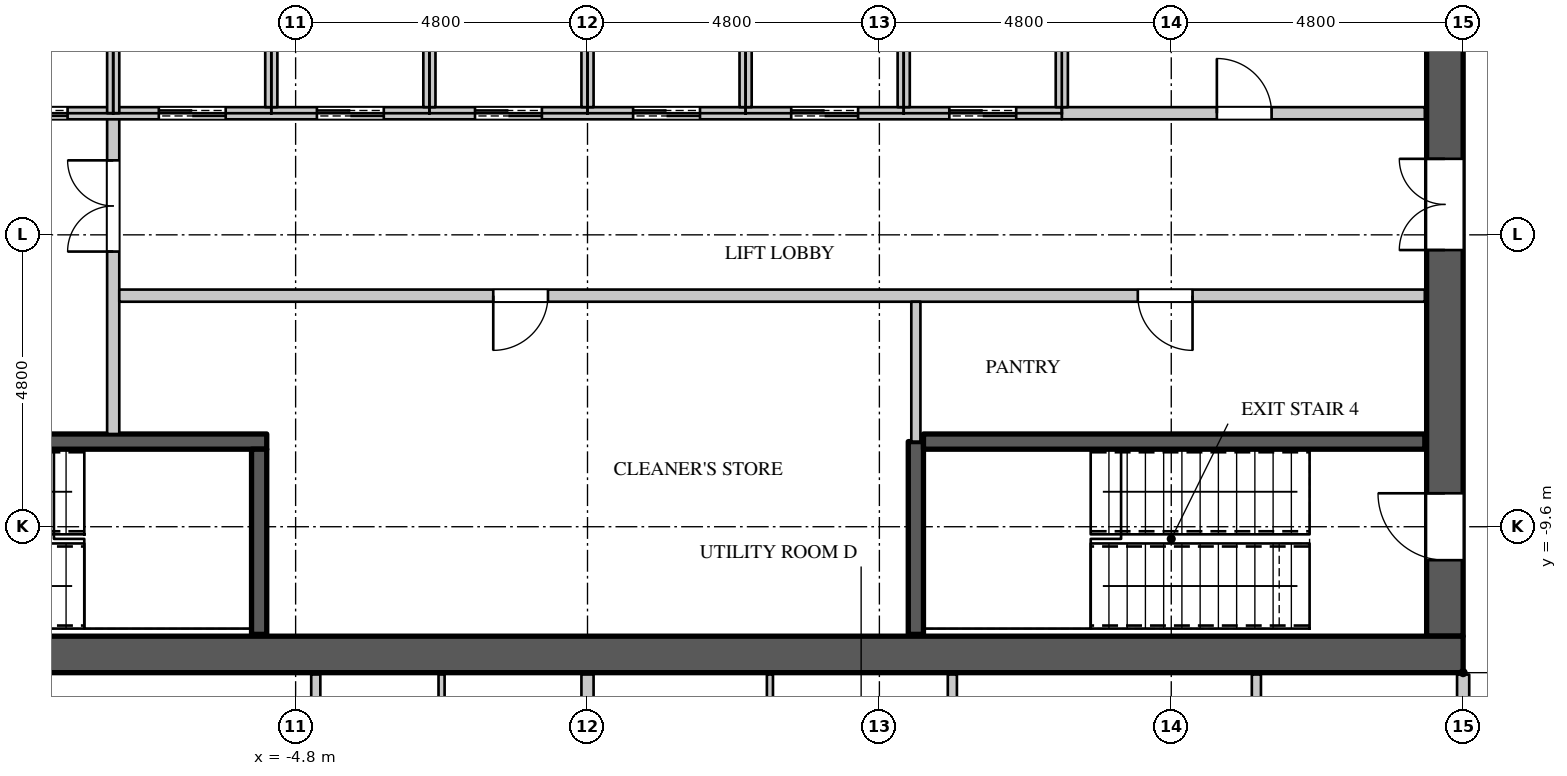
"""IFC4 building model, lengths in metres.
Left out: names, types, materials, properties, quantities, classifications, styles, units other than length and angle.
Written with IfcOpenShell. Run it as: python <this file> out.ifc"""

import sys

from ifc_helpers import new_model, si_unit, direction, frame, frame_2d, origin, place, context, subcontext, project, spatial, rectangle, extrude, element, fill, save


model = new_model("IFC4")
c1 = context("Model", 3, precision=1e-05, world=origin(), true_north=direction((0.0, 1.0)))
c2 = subcontext(c1, "Body", "Model", "MODEL_VIEW")
j1 = project(units=[si_unit("LENGTHUNIT", "METRE"), si_unit("PLANEANGLEUNIT", "RADIAN")], contexts=[c1])
p1 = place(None, origin())
s1 = spatial("IfcSite", under=j1, at=p1, CompositionType="ELEMENT")
p2 = place(p1, origin())
s2 = spatial("IfcBuilding", under=s1, at=p2, CompositionType="ELEMENT")
p3 = place(p2, frame((0.0, 0.0, 226.5)))
s3 = spatial("IfcBuildingStorey", under=s2, at=p3, CompositionType="ELEMENT", Elevation=226.5)
p4 = place(p3, frame((-14.4, -11.7, 0.0), z_axis=(0.0, 0.0, 1.0), x_axis=(1.0, 0.0, 0.0)))
e1 = element("IfcWall", 1, at=p4, inside=s3, PredefinedType="SHEAR", context=c2, shape_type="SweptSolid", body=[
    extrude(rectangle(XDim=28.8, YDim=0.6, at=frame_2d((14.4, 0.0))), origin(), (0.0, 0.0, 1.0), 4.2),
])
p5 = place(p3, frame((14.1, -11.4, 0.0), z_axis=(0.0, 0.0, 1.0), x_axis=(0.0, 1.0, 0.0)))
e2 = element("IfcWall", 2, at=p5, inside=s3, PredefinedType="SHEAR", context=c2, shape_type="SweptSolid", body=[
    extrude(rectangle(XDim=22.8, YDim=0.6, at=frame_2d((11.4, 0.0))), origin(), (0.0, 0.0, 1.0), 4.2),
])
p6 = place(p5, frame((20.45, 0.0, 0.0)))
e3 = element("IfcOpeningElement", 3, at=p6, cuts=e2, PredefinedType="OPENING", context=c2, shape_type="SweptSolid", body=[
    extrude(rectangle(XDim=1.1, YDim=2.2, at=frame_2d((0.55, 1.1))), frame((0.0, 0.31, 0.0), z_axis=(0.0, -1.0, 0.0), x_axis=(1.0, 0.0, 0.0)), (0.0, 0.0, 1.0), 0.62),
])
p7 = place(p5, frame((1.25, 0.0, 0.0)))
e4 = element("IfcOpeningElement", 4, at=p7, cuts=e2, PredefinedType="OPENING", context=c2, shape_type="SweptSolid", body=[
    extrude(rectangle(XDim=1.1, YDim=2.2, at=frame_2d((0.55, 1.1))), frame((0.0, 0.31, 0.0), z_axis=(0.0, -1.0, 0.0), x_axis=(1.0, 0.0, 0.0)), (0.0, 0.0, 1.0), 0.62),
])
p8 = place(p5, frame((14.95, 0.0, 0.0)))
e5 = element("IfcOpeningElement", 5, at=p8, cuts=e2, PredefinedType="OPENING", context=c2, shape_type="SweptSolid", body=[
    extrude(rectangle(XDim=1.5, YDim=2.4, at=frame_2d((0.75, 1.2))), frame((0.0, 0.31, 0.0), z_axis=(0.0, -1.0, 0.0), x_axis=(1.0, 0.0, 0.0)), (0.0, 0.0, 1.0), 0.62),
])
p9 = place(p5, frame((6.35, 0.0, 0.0)))
e6 = element("IfcOpeningElement", 6, at=p9, cuts=e2, PredefinedType="OPENING", context=c2, shape_type="SweptSolid", body=[
    extrude(rectangle(XDim=1.5, YDim=2.4, at=frame_2d((0.75, 1.2))), frame((0.0, 0.31, 0.0), z_axis=(0.0, -1.0, 0.0), x_axis=(1.0, 0.0, 0.0)), (0.0, 0.0, 1.0), 0.62),
])
p10 = place(p3, frame((-7.8, -8.075, 0.0), z_axis=(0.0, 0.0, 1.0), x_axis=(0.0, 1.0, 0.0)))
e7 = element("IfcWall", 7, at=p10, inside=s3, PredefinedType="PARTITIONING", context=c2, shape_type="SweptSolid", body=[
    extrude(rectangle(XDim=5.275, YDim=0.2, at=frame_2d((2.637, 0.0))), origin(), (0.0, 0.0, 1.0), 3.95),
])
p11 = place(p10, frame((3.0, 0.0, 0.0)))
e8 = element("IfcOpeningElement", 8, at=p11, cuts=e7, PredefinedType="OPENING", context=c2, shape_type="SweptSolid", body=[
    extrude(rectangle(XDim=1.5, YDim=2.4, at=frame_2d((0.75, 1.2))), frame((0.0, 0.11, 0.0), z_axis=(0.0, -1.0, 0.0), x_axis=(1.0, 0.0, 0.0)), (0.0, 0.0, 1.0), 0.22),
])
p12 = place(p3, frame((-7.7, -5.8, 0.0), z_axis=(0.0, 0.0, 1.0), x_axis=(1.0, 0.0, 0.0)))
e9 = element("IfcWall", 9, at=p12, inside=s3, PredefinedType="PARTITIONING", context=c2, shape_type="SweptSolid", body=[
    extrude(rectangle(XDim=21.47, YDim=0.2, at=frame_2d((10.735, 0.0))), origin(), (0.0, 0.0, 1.0), 3.95),
])
p13 = place(p12, frame((6.15, 0.0, 0.0)))
e10 = element("IfcOpeningElement", 10, at=p13, cuts=e9, PredefinedType="OPENING", context=c2, shape_type="SweptSolid", body=[
    extrude(rectangle(XDim=0.9, YDim=2.2, at=frame_2d((0.45, 1.1))), frame((0.0, 0.11, 0.0), z_axis=(0.0, -1.0, 0.0), x_axis=(1.0, 0.0, 0.0)), (0.0, 0.0, 1.0), 0.22),
])
p14 = place(p12, frame((16.75, 0.0, 0.0)))
e11 = element("IfcOpeningElement", 11, at=p14, cuts=e9, PredefinedType="OPENING", context=c2, shape_type="SweptSolid", body=[
    extrude(rectangle(XDim=0.9, YDim=2.2, at=frame_2d((0.45, 1.1))), frame((0.0, 0.11, 0.0), z_axis=(0.0, -1.0, 0.0), x_axis=(1.0, 0.0, 0.0)), (0.0, 0.0, 1.0), 0.22),
])
p15 = place(p3, frame((14.4, -14.3, 0.0), z_axis=(0.0, 0.0, 1.0), x_axis=(0.0, 1.0, 0.0)))
e12 = element("IfcWall", 12, at=p15, inside=s3, PredefinedType="PARTITIONING", context=c2, shape_type="SweptSolid", body=[
    extrude(rectangle(XDim=2.27, YDim=0.2, at=frame_2d((1.135, 0.0))), origin(), (0.0, 0.0, 1.0), 3.95),
])
p16 = place(p15, frame((0.55, 0.0, 0.0)))
e13 = element("IfcOpeningElement", 13, at=p16, cuts=e12, PredefinedType="OPENING", context=c2, shape_type="SweptSolid", body=[
    extrude(rectangle(XDim=1.1, YDim=2.4, at=frame_2d((0.55, 1.2))), frame((0.0, 0.11, 0.0), z_axis=(0.0, -1.0, 0.0), x_axis=(1.0, 0.0, 0.0)), (0.0, 0.0, 1.0), 0.22),
])
p17 = place(p3, frame((-4.469, -25.95, 0.0), z_axis=(0.0, 0.0, 1.0), x_axis=(0.0, 1.0, 0.0)))
e14 = element("IfcWall", 14, at=p17, inside=s3, PredefinedType="PARTITIONING", context=c2, shape_type="SweptSolid", body=[
    extrude(rectangle(XDim=13.92, YDim=0.15, at=frame_2d((6.96, 0.0))), origin(), (0.0, 0.0, 1.0), 3.3),
])
p18 = place(p17, frame((3.3, 0.0, 0.0)))
e15 = element("IfcOpeningElement", 15, at=p18, cuts=e14, PredefinedType="OPENING", context=c2, shape_type="SweptSolid", body=[
    extrude(rectangle(XDim=0.95, YDim=2.2, at=frame_2d((0.475, 1.1))), frame((0.0, 0.085, 0.0), z_axis=(0.0, -1.0, 0.0), x_axis=(1.0, 0.0, 0.0)), (0.0, 0.0, 1.0), 0.17),
])
p19 = place(p3, frame((5.4, -8.2, 0.0), z_axis=(0.0, 0.0, 1.0), x_axis=(0.0, 1.0, 0.0)))
e16 = element("IfcWall", 16, at=p19, inside=s3, PredefinedType="PARTITIONING", context=c2, shape_type="SweptSolid", body=[
    extrude(rectangle(XDim=2.3, YDim=0.15, at=frame_2d((1.15, 0.0))), origin(), (0.0, 0.0, 1.0), 3.95),
])
p20 = place(p3, frame((6.0, -18.625, 0.0), z_axis=(0.0, 0.0, 1.0), x_axis=(0.0, 1.0, 0.0)))
e17 = element("IfcWall", 17, at=p20, inside=s3, PredefinedType="PARTITIONING", context=c2, shape_type="SweptSolid", body=[
    extrude(rectangle(XDim=6.595, YDim=0.15, at=frame_2d((3.297, 0.0))), origin(), (0.0, 0.0, 1.0), 3.95),
])
p21 = place(p20, frame((2.85, 0.0, 0.0)))
e18 = element("IfcOpeningElement", 18, at=p21, cuts=e17, PredefinedType="OPENING", context=c2, shape_type="SweptSolid", body=[
    extrude(rectangle(XDim=0.9, YDim=2.2, at=frame_2d((0.45, 1.1))), frame((0.0, 0.085, 0.0), z_axis=(0.0, -1.0, 0.0), x_axis=(1.0, 0.0, 0.0)), (0.0, 0.0, 1.0), 0.17),
])
p22 = place(p3, frame((11.0, -17.675, 0.0), z_axis=(0.0, 0.0, 1.0), x_axis=(0.0, 1.0, 0.0)))
e19 = element("IfcWall", 19, at=p22, inside=s3, PredefinedType="PARTITIONING", context=c2, shape_type="SweptSolid", body=[
    extrude(rectangle(XDim=5.645, YDim=0.15, at=frame_2d((2.823, 0.0))), origin(), (0.0, 0.0, 1.0), 3.95),
])
p23 = place(p22, frame((2.35, 0.0, 0.0)))
e20 = element("IfcOpeningElement", 20, at=p23, cuts=e19, PredefinedType="OPENING", context=c2, shape_type="SweptSolid", body=[
    extrude(rectangle(XDim=0.95, YDim=2.2, at=frame_2d((0.475, 1.1))), frame((0.0, 0.085, 0.0), z_axis=(0.0, -1.0, 0.0), x_axis=(1.0, 0.0, 0.0)), (0.0, 0.0, 1.0), 0.17),
])
p24 = place(p3, frame((0.0, -26.455, 0.0), z_axis=(0.0, 0.0, 1.0), x_axis=(0.0, 1.0, 0.0)))
e21 = element("IfcWall", 21, at=p24, inside=s3, PredefinedType="PARTITIONING", context=c2, shape_type="SweptSolid", body=[
    extrude(rectangle(XDim=14.425, YDim=0.2, at=frame_2d((7.212, 0.0))), origin(), (0.0, 0.0, 1.0), 3.95),
])
p25 = place(p3, frame((7.8, -2.8, 0.0), z_axis=(0.0, 0.0, 1.0), x_axis=(1.0, 0.0, 0.0)))
e22 = element("IfcWall", 22, at=p25, inside=s3, PredefinedType="PARTITIONING", context=c2, shape_type="SweptSolid", body=[
    extrude(rectangle(XDim=5.97, YDim=0.2, at=frame_2d((2.985, 0.0))), origin(), (0.0, 0.0, 1.0), 3.95),
])
p26 = place(p25, frame((2.55, 0.0, 0.0)))
e23 = element("IfcOpeningElement", 23, at=p26, cuts=e22, PredefinedType="OPENING", context=c2, shape_type="SweptSolid", body=[
    extrude(rectangle(XDim=0.9, YDim=2.2, at=frame_2d((0.45, 1.1))), frame((0.0, 0.11, 0.0), z_axis=(0.0, -1.0, 0.0), x_axis=(1.0, 0.0, 0.0)), (0.0, 0.0, 1.0), 0.22),
])
p27 = place(p3, frame((-10.4, -2.8, 0.0), z_axis=(0.0, 0.0, 1.0), x_axis=(1.0, 0.0, 0.0)))
e24 = element("IfcWall", 24, at=p27, inside=s3, PredefinedType="PARTITIONING", context=c2, shape_type="SweptSolid", body=[
    extrude(rectangle(XDim=18.2, YDim=0.2, at=frame_2d((9.1, 0.0))), origin(), (0.0, 0.0, 1.0), 3.95),
])
p28 = place(p27, frame((0.75, 0.0, 0.0)))
e25 = element("IfcOpeningElement", 25, at=p28, cuts=e24, PredefinedType="OPENING", context=c2, shape_type="SweptSolid", body=[
    extrude(rectangle(XDim=1.1, YDim=2.2, at=frame_2d((0.55, 1.1))), frame((0.0, 0.11, 0.0), z_axis=(0.0, -1.0, 0.0), x_axis=(1.0, 0.0, 0.0)), (0.0, 0.0, 1.0), 0.22),
])
p29 = place(p27, frame((3.35, 0.0, 0.0)))
e26 = element("IfcOpeningElement", 26, at=p29, cuts=e24, PredefinedType="OPENING", context=c2, shape_type="SweptSolid", body=[
    extrude(rectangle(XDim=1.1, YDim=2.2, at=frame_2d((0.55, 1.1))), frame((0.0, 0.11, 0.0), z_axis=(0.0, -1.0, 0.0), x_axis=(1.0, 0.0, 0.0)), (0.0, 0.0, 1.0), 0.22),
])
p30 = place(p27, frame((5.95, 0.0, 0.0)))
e27 = element("IfcOpeningElement", 27, at=p30, cuts=e24, PredefinedType="OPENING", context=c2, shape_type="SweptSolid", body=[
    extrude(rectangle(XDim=1.1, YDim=2.2, at=frame_2d((0.55, 1.1))), frame((0.0, 0.11, 0.0), z_axis=(0.0, -1.0, 0.0), x_axis=(1.0, 0.0, 0.0)), (0.0, 0.0, 1.0), 0.22),
])
p31 = place(p27, frame((8.55, 0.0, 0.0)))
e28 = element("IfcOpeningElement", 28, at=p31, cuts=e24, PredefinedType="OPENING", context=c2, shape_type="SweptSolid", body=[
    extrude(rectangle(XDim=1.1, YDim=2.2, at=frame_2d((0.55, 1.1))), frame((0.0, 0.11, 0.0), z_axis=(0.0, -1.0, 0.0), x_axis=(1.0, 0.0, 0.0)), (0.0, 0.0, 1.0), 0.22),
])
p32 = place(p27, frame((11.15, 0.0, 0.0)))
e29 = element("IfcOpeningElement", 29, at=p32, cuts=e24, PredefinedType="OPENING", context=c2, shape_type="SweptSolid", body=[
    extrude(rectangle(XDim=1.1, YDim=2.2, at=frame_2d((0.55, 1.1))), frame((0.0, 0.11, 0.0), z_axis=(0.0, -1.0, 0.0), x_axis=(1.0, 0.0, 0.0)), (0.0, 0.0, 1.0), 0.22),
])
p33 = place(p27, frame((13.75, 0.0, 0.0)))
e30 = element("IfcOpeningElement", 30, at=p33, cuts=e24, PredefinedType="OPENING", context=c2, shape_type="SweptSolid", body=[
    extrude(rectangle(XDim=1.1, YDim=2.2, at=frame_2d((0.55, 1.1))), frame((0.0, 0.11, 0.0), z_axis=(0.0, -1.0, 0.0), x_axis=(1.0, 0.0, 0.0)), (0.0, 0.0, 1.0), 0.22),
])
p34 = place(p27, frame((16.35, 0.0, 0.0)))
e31 = element("IfcOpeningElement", 31, at=p34, cuts=e24, PredefinedType="OPENING", context=c2, shape_type="SweptSolid", body=[
    extrude(rectangle(XDim=1.1, YDim=2.2, at=frame_2d((0.55, 1.1))), frame((0.0, 0.11, 0.0), z_axis=(0.0, -1.0, 0.0), x_axis=(1.0, 0.0, 0.0)), (0.0, 0.0, 1.0), 0.22),
])
p35 = place(p3, frame((-7.8, -2.8, 0.0), z_axis=(0.0, 0.0, 1.0), x_axis=(0.0, 1.0, 0.0)))
e32 = element("IfcWall", 32, at=p35, inside=s3, PredefinedType="PARTITIONING", context=c2, shape_type="SweptSolid", body=[
    extrude(rectangle(XDim=2.8, YDim=0.2, at=frame_2d((1.4, 0.0))), origin(), (0.0, 0.0, 1.0), 3.95),
])
for number, where, z_axis, x_axis in (
    (33, (-5.2, -2.7, 0.0), (0.0, 0.0, 1.0), (0.0, 1.0, 0.0)),
    (34, (-2.6, -2.7, 0.0), (0.0, 0.0, 1.0), (0.0, 1.0, 0.0)),
    (35, (0.0, -2.7, 0.0), (0.0, 0.0, 1.0), (0.0, 1.0, 0.0)),
    (36, (2.6, -2.7, 0.0), (0.0, 0.0, 1.0), (0.0, 1.0, 0.0)),
    (37, (5.2, -2.7, 0.0), (0.0, 0.0, 1.0), (0.0, 1.0, 0.0)),
    (38, (7.8, -2.7, 0.0), (0.0, 0.0, 1.0), (0.0, 1.0, 0.0)),
):
    element("IfcWall", number, at=place(p3, frame(where, z_axis=z_axis, x_axis=x_axis)), inside=s3, PredefinedType="PARTITIONING", context=c2, shape_type="SweptSolid", body=[
        extrude(rectangle(XDim=2.6, YDim=0.2, at=frame_2d((1.3, 0.0))), origin(), (0.0, 0.0, 1.0), 3.95),
    ])
p36 = place(p3, frame((-13.77, -8.2, 0.0), z_axis=(0.0, 0.0, 1.0), x_axis=(1.0, 0.0, 0.0)))
e39 = element("IfcWall", 39, at=p36, inside=s3, PredefinedType="SHEAR", context=c2, shape_type="SweptSolid", body=[
    extrude(rectangle(XDim=8.495, YDim=0.25, at=frame_2d((4.248, 0.0))), origin(), (0.0, 0.0, 1.0), 3.95),
])
p37 = place(p36, frame((0.15, 0.0, 0.0)))
e40 = element("IfcOpeningElement", 40, at=p37, cuts=e39, PredefinedType="OPENING", context=c2, shape_type="SweptSolid", body=[
    extrude(rectangle(XDim=1.1, YDim=2.2, at=frame_2d((0.55, 1.1))), frame((0.0, 0.135, 0.0), z_axis=(0.0, -1.0, 0.0), x_axis=(1.0, 0.0, 0.0)), (0.0, 0.0, 1.0), 0.27),
])
p38 = place(p3, frame((-5.4, -11.37, 0.0), z_axis=(0.0, 0.0, 1.0), x_axis=(0.0, 1.0, 0.0)))
e41 = element("IfcWall", 41, at=p38, inside=s3, PredefinedType="SHEAR", context=c2, shape_type="SweptSolid", body=[
    extrude(rectangle(XDim=3.045, YDim=0.25, at=frame_2d((1.522, 0.0))), origin(), (0.0, 0.0, 1.0), 3.95),
])
p39 = place(p3, frame((5.4, -11.37, 0.0), z_axis=(0.0, 0.0, 1.0), x_axis=(0.0, 1.0, 0.0)))
e42 = element("IfcWall", 42, at=p39, inside=s3, PredefinedType="SHEAR", context=c2, shape_type="SweptSolid", body=[
    extrude(rectangle(XDim=3.17, YDim=0.25, at=frame_2d((1.585, 0.0))), origin(), (0.0, 0.0, 1.0), 3.95),
])
p40 = place(p3, frame((5.525, -8.2, 0.0), z_axis=(0.0, 0.0, 1.0), x_axis=(1.0, 0.0, 0.0)))
e43 = element("IfcWall", 43, at=p40, inside=s3, PredefinedType="SHEAR", context=c2, shape_type="SweptSolid", body=[
    extrude(rectangle(XDim=8.245, YDim=0.25, at=frame_2d((4.123, 0.0))), origin(), (0.0, 0.0, 1.0), 3.95),
])
p41 = place(p3, frame((-2.4, -17.925, 0.0), z_axis=(0.0, 0.0, 1.0), x_axis=(0.0, 1.0, 0.0)))
e44 = element("IfcWall", 44, at=p41, inside=s3, PredefinedType="PARTITIONING", context=c2, shape_type="SweptSolid", body=[
    extrude(rectangle(XDim=5.895, YDim=0.1, at=frame_2d((2.948, 0.0))), origin(), (0.0, 0.0, 1.0), 3.95),
])
p42 = place(p3, frame((3.0, -18.125, 0.0), z_axis=(0.0, 0.0, 1.0), x_axis=(0.0, 1.0, 0.0)))
e45 = element("IfcWall", 45, at=p42, inside=s3, PredefinedType="PARTITIONING", context=c2, shape_type="SweptSolid", body=[
    extrude(rectangle(XDim=6.095, YDim=0.1, at=frame_2d((3.047, 0.0))), origin(), (0.0, 0.0, 1.0), 3.95),
])
p43 = place(p26, origin())
e46 = element("IfcDoor", 46, at=p43, inside=s3, OperationType="SINGLE_SWING_LEFT", PredefinedType="DOOR", context=c2, shape_type="SweptSolid", body=[
    extrude(rectangle(XDim=0.9, YDim=2.2, at=frame_2d((0.45, 1.1))), frame((0.0, 0.025, 0.0), z_axis=(0.0, -1.0, 0.0), x_axis=(1.0, 0.0, 0.0)), (0.0, 0.0, 1.0), 0.05),
])
fill(e23, e46)
p44 = place(p13, origin())
e47 = element("IfcDoor", 47, at=p44, inside=s3, OperationType="SINGLE_SWING_RIGHT", PredefinedType="DOOR", context=c2, shape_type="SweptSolid", body=[
    extrude(rectangle(XDim=0.9, YDim=2.2, at=frame_2d((0.45, 1.1))), frame((0.0, 0.025, 0.0), z_axis=(0.0, -1.0, 0.0), x_axis=(1.0, 0.0, 0.0)), (0.0, 0.0, 1.0), 0.05),
])
fill(e10, e47)
p45 = place(p14, origin())
e48 = element("IfcDoor", 48, at=p45, inside=s3, OperationType="SINGLE_SWING_LEFT", PredefinedType="DOOR", context=c2, shape_type="SweptSolid", body=[
    extrude(rectangle(XDim=0.9, YDim=2.2, at=frame_2d((0.45, 1.1))), frame((0.0, 0.025, 0.0), z_axis=(0.0, -1.0, 0.0), x_axis=(1.0, 0.0, 0.0)), (0.0, 0.0, 1.0), 0.05),
])
fill(e11, e48)
p46 = place(p28, origin())
e49 = element("IfcDoor", 49, at=p46, inside=s3, OperationType="DOUBLE_DOOR_SLIDING", PredefinedType="DOOR", context=c2, shape_type="SweptSolid", body=[
    extrude(rectangle(XDim=1.1, YDim=2.2, at=frame_2d((0.55, 1.1))), frame((0.0, 0.025, 0.0), z_axis=(0.0, -1.0, 0.0), x_axis=(1.0, 0.0, 0.0)), (0.0, 0.0, 1.0), 0.05),
])
fill(e25, e49)
p47 = place(p29, origin())
e50 = element("IfcDoor", 50, at=p47, inside=s3, OperationType="DOUBLE_DOOR_SLIDING", PredefinedType="DOOR", context=c2, shape_type="SweptSolid", body=[
    extrude(rectangle(XDim=1.1, YDim=2.2, at=frame_2d((0.55, 1.1))), frame((0.0, 0.025, 0.0), z_axis=(0.0, -1.0, 0.0), x_axis=(1.0, 0.0, 0.0)), (0.0, 0.0, 1.0), 0.05),
])
fill(e26, e50)
p48 = place(p30, origin())
e51 = element("IfcDoor", 51, at=p48, inside=s3, OperationType="DOUBLE_DOOR_SLIDING", PredefinedType="DOOR", context=c2, shape_type="SweptSolid", body=[
    extrude(rectangle(XDim=1.1, YDim=2.2, at=frame_2d((0.55, 1.1))), frame((0.0, 0.025, 0.0), z_axis=(0.0, -1.0, 0.0), x_axis=(1.0, 0.0, 0.0)), (0.0, 0.0, 1.0), 0.05),
])
fill(e27, e51)
p49 = place(p31, origin())
e52 = element("IfcDoor", 52, at=p49, inside=s3, OperationType="DOUBLE_DOOR_SLIDING", PredefinedType="DOOR", context=c2, shape_type="SweptSolid", body=[
    extrude(rectangle(XDim=1.1, YDim=2.2, at=frame_2d((0.55, 1.1))), frame((0.0, 0.025, 0.0), z_axis=(0.0, -1.0, 0.0), x_axis=(1.0, 0.0, 0.0)), (0.0, 0.0, 1.0), 0.05),
])
fill(e28, e52)
p50 = place(p32, origin())
e53 = element("IfcDoor", 53, at=p50, inside=s3, OperationType="DOUBLE_DOOR_SLIDING", PredefinedType="DOOR", context=c2, shape_type="SweptSolid", body=[
    extrude(rectangle(XDim=1.1, YDim=2.2, at=frame_2d((0.55, 1.1))), frame((0.0, 0.025, 0.0), z_axis=(0.0, -1.0, 0.0), x_axis=(1.0, 0.0, 0.0)), (0.0, 0.0, 1.0), 0.05),
])
fill(e29, e53)
p51 = place(p33, origin())
e54 = element("IfcDoor", 54, at=p51, inside=s3, OperationType="DOUBLE_DOOR_SLIDING", PredefinedType="DOOR", context=c2, shape_type="SweptSolid", body=[
    extrude(rectangle(XDim=1.1, YDim=2.2, at=frame_2d((0.55, 1.1))), frame((0.0, 0.025, 0.0), z_axis=(0.0, -1.0, 0.0), x_axis=(1.0, 0.0, 0.0)), (0.0, 0.0, 1.0), 0.05),
])
fill(e30, e54)
p52 = place(p34, origin())
e55 = element("IfcDoor", 55, at=p52, inside=s3, OperationType="DOUBLE_DOOR_SLIDING", PredefinedType="DOOR", context=c2, shape_type="SweptSolid", body=[
    extrude(rectangle(XDim=1.1, YDim=2.2, at=frame_2d((0.55, 1.1))), frame((0.0, 0.025, 0.0), z_axis=(0.0, -1.0, 0.0), x_axis=(1.0, 0.0, 0.0)), (0.0, 0.0, 1.0), 0.05),
])
fill(e31, e55)
p53 = place(p11, origin())
e56 = element("IfcDoor", 56, at=p53, inside=s3, OperationType="DOUBLE_DOOR_SINGLE_SWING", PredefinedType="DOOR", context=c2, shape_type="SweptSolid", body=[
    extrude(rectangle(XDim=1.5, YDim=2.4, at=frame_2d((0.75, 1.2))), frame((0.0, 0.025, 0.0), z_axis=(0.0, -1.0, 0.0), x_axis=(1.0, 0.0, 0.0)), (0.0, 0.0, 1.0), 0.05),
])
fill(e8, e56)
p54 = place(p7, origin())
e57 = element("IfcDoor", 57, at=p54, inside=s3, OperationType="SINGLE_SWING_RIGHT", PredefinedType="DOOR", context=c2, shape_type="SweptSolid", body=[
    extrude(rectangle(XDim=1.1, YDim=2.2, at=frame_2d((0.55, 1.1))), frame((0.0, 0.295, 0.0), z_axis=(0.0, -1.0, 0.0), x_axis=(1.0, 0.0, 0.0)), (0.0, 0.0, 1.0), 0.05),
])
fill(e4, e57)
p55 = place(p9, origin())
e58 = element("IfcDoor", 58, at=p55, inside=s3, OperationType="DOUBLE_DOOR_SINGLE_SWING", PredefinedType="DOOR", context=c2, shape_type="SweptSolid", body=[
    extrude(rectangle(XDim=1.5, YDim=2.4, at=frame_2d((0.75, 1.2))), frame((0.0, 0.295, 0.0), z_axis=(0.0, -1.0, 0.0), x_axis=(1.0, 0.0, 0.0)), (0.0, 0.0, 1.0), 0.05),
])
fill(e6, e58)
save(model, sys.argv[1])
